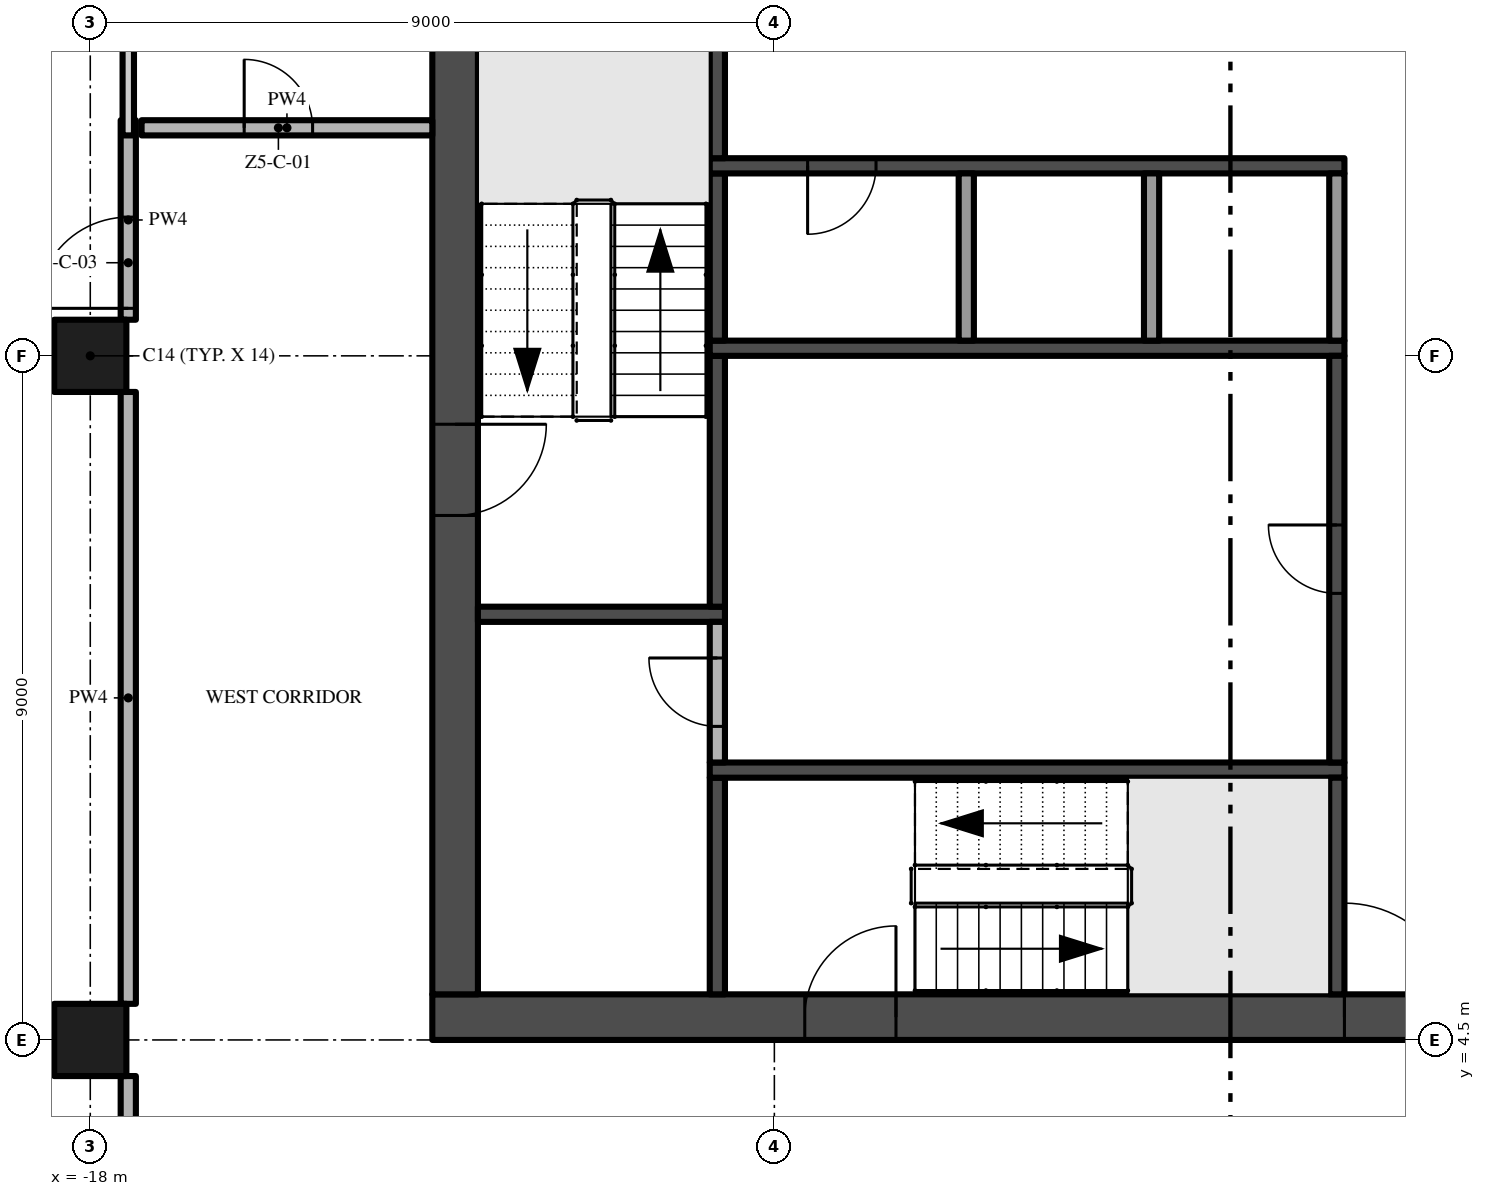
"""IFC4 building model, lengths in metres.
Left out: names, types, materials, properties, quantities, classifications, styles, units other than length and angle.
Written with IfcOpenShell. Run it as: python <this file> out.ifc"""

import sys

from ifc_helpers import new_model, si_unit, direction, frame, frame_2d, origin, origin_2d, place, context, subcontext, project, spatial, rectangle, extrude, element, fill, save


model = new_model("IFC4")
c1 = context("Model", 3, precision=1e-05, world=origin(), true_north=direction((0.0, 1.0)))
c2 = subcontext(c1, "Body", "Model", "MODEL_VIEW")
j1 = project(units=[si_unit("LENGTHUNIT", "METRE"), si_unit("PLANEANGLEUNIT", "RADIAN")], contexts=[c1])
p1 = place(None, origin())
s1 = spatial("IfcSite", under=j1, at=p1, CompositionType="ELEMENT")
p2 = place(p1, origin())
s2 = spatial("IfcBuilding", under=s1, at=p2, CompositionType="ELEMENT")
p3 = place(p2, frame((0.0, 0.0, 269.2)))
s3 = spatial("IfcBuildingStorey", under=s2, at=p3, CompositionType="ELEMENT", Elevation=269.2)
p4 = place(p3, frame((-13.5, 4.8, -0.3), z_axis=(0.0, 0.0, 1.0), x_axis=(1.0, 0.0, 0.0)))
e1 = element("IfcWall", 1, at=p4, inside=s3, PredefinedType="SHEAR", context=c2, shape_type="SweptSolid", body=[
    extrude(rectangle(XDim=27.0, YDim=0.6, at=frame_2d((13.5, 0.0))), origin(), (0.0, 0.0, 1.0), 3.8),
])
p5 = place(p4, frame((12.0, 0.0, 0.3)))
e2 = element("IfcOpeningElement", 2, at=p5, cuts=e1, PredefinedType="OPENING", context=c2, shape_type="SweptSolid", body=[
    extrude(rectangle(XDim=3.0, YDim=2.4, at=frame_2d((1.5, 1.2))), frame((0.0, 0.31, 0.0), z_axis=(0.0, -1.0, 0.0), x_axis=(1.0, 0.0, 0.0)), (0.0, 0.0, 1.0), 0.62),
])
p6 = place(p4, frame((4.9, 0.0, 0.3)))
e3 = element("IfcOpeningElement", 3, at=p6, cuts=e1, PredefinedType="OPENING", context=c2, shape_type="SweptSolid", body=[
    extrude(rectangle(XDim=1.2, YDim=2.2, at=frame_2d((0.6, 1.1))), frame((0.0, 0.31, 0.0), z_axis=(0.0, -1.0, 0.0), x_axis=(1.0, 0.0, 0.0)), (0.0, 0.0, 1.0), 0.62),
])
p7 = place(p4, frame((20.75, 0.0, 0.3)))
e4 = element("IfcOpeningElement", 4, at=p7, cuts=e1, PredefinedType="OPENING", context=c2, shape_type="SweptSolid", body=[
    extrude(rectangle(XDim=1.5, YDim=2.2, at=frame_2d((0.75, 1.1))), frame((0.0, 0.31, 0.0), z_axis=(0.0, -1.0, 0.0), x_axis=(1.0, 0.0, 0.0)), (0.0, 0.0, 1.0), 0.62),
])
p8 = place(p4, frame((17.4, 0.0, 0.3)))
e5 = element("IfcOpeningElement", 5, at=p8, cuts=e1, PredefinedType="OPENING", context=c2, shape_type="SweptSolid", body=[
    extrude(rectangle(XDim=1.2, YDim=2.2, at=frame_2d((0.6, 1.1))), frame((0.0, 0.31, 0.0), z_axis=(0.0, -1.0, 0.0), x_axis=(1.0, 0.0, 0.0)), (0.0, 0.0, 1.0), 0.62),
])
p9 = place(p3, frame((-13.2, 21.9, -0.3), z_axis=(0.0, 0.0, 1.0), x_axis=(0.0, -1.0, 0.0)))
e6 = element("IfcWall", 6, at=p9, inside=s3, PredefinedType="SHEAR", context=c2, shape_type="SweptSolid", body=[
    extrude(rectangle(XDim=16.8, YDim=0.6, at=frame_2d((8.4, 0.0))), origin(), (0.0, 0.0, 1.0), 3.8),
])
p10 = place(p9, frame((9.3, 0.0, 0.3)))
e7 = element("IfcOpeningElement", 7, at=p10, cuts=e6, PredefinedType="OPENING", context=c2, shape_type="SweptSolid", body=[
    extrude(rectangle(XDim=1.2, YDim=2.2, at=frame_2d((0.6, 1.1))), frame((0.0, 0.31, 0.0), z_axis=(0.0, -1.0, 0.0), x_axis=(1.0, 0.0, 0.0)), (0.0, 0.0, 1.0), 0.62),
])
for number, where, z_axis, x_axis in (
    (8, (-18.0, 13.5, 0.0), (0.0, 0.0, 1.0), (1.0, 0.0, 0.0)),
    (9, (-18.0, 4.5, 0.0), (0.0, 0.0, 1.0), (1.0, 0.0, 0.0)),
):
    element("IfcColumn", number, at=place(p3, frame(where, z_axis=z_axis, x_axis=x_axis)), inside=s3, PredefinedType="COLUMN", context=c2, shape_type="SweptSolid", body=[
        extrude(rectangle(XDim=0.95, YDim=0.95, at=origin_2d()), origin(), (0.0, 0.0, 1.0), 3.5),
    ])
p11 = place(p3, frame((-12.9, 10.1, 0.0), z_axis=(0.0, 0.0, 1.0), x_axis=(1.0, 0.0, 0.0)))
e10 = element("IfcWall", 10, at=p11, inside=s3, PredefinedType="SHEAR", context=c2, shape_type="SweptSolid", body=[
    extrude(rectangle(XDim=3.25, YDim=0.2, at=frame_2d((1.625, 0.0))), origin(), (0.0, 0.0, 1.0), 3.5),
])
p12 = place(p3, frame((-9.75, 5.1, 0.0), z_axis=(0.0, 0.0, 1.0), x_axis=(0.0, 1.0, 0.0)))
e11 = element("IfcWall", 11, at=p12, inside=s3, PredefinedType="SHEAR", context=c2, shape_type="SweptSolid", body=[
    extrude(rectangle(XDim=2.85, YDim=0.2, at=frame_2d((1.425, 0.0))), origin(), (0.0, 0.0, 1.0), 3.5),
])
p13 = place(p3, frame((-9.85, 8.05, 0.0), z_axis=(0.0, 0.0, 1.0), x_axis=(1.0, 0.0, 0.0)))
e12 = element("IfcWall", 12, at=p13, inside=s3, PredefinedType="SHEAR", context=c2, shape_type="SweptSolid", body=[
    extrude(rectangle(XDim=8.35, YDim=0.2, at=frame_2d((4.175, 0.0))), origin(), (0.0, 0.0, 1.0), 3.5),
])
p14 = place(p3, frame((-9.75, 8.15, 0.0), z_axis=(0.0, 0.0, 1.0), x_axis=(0.0, 1.0, 0.0)))
e13 = element("IfcWall", 13, at=p14, inside=s3, PredefinedType="PARTITIONING", context=c2, shape_type="SweptSolid", body=[
    extrude(rectangle(XDim=1.85, YDim=0.2, at=frame_2d((0.925, 0.0))), origin(), (0.0, 0.0, 1.0), 3.5),
])
p15 = place(p14, frame((0.475, 0.0, 0.0)))
e14 = element("IfcOpeningElement", 14, at=p15, cuts=e13, PredefinedType="OPENING", context=c2, shape_type="SweptSolid", body=[
    extrude(rectangle(XDim=0.9, YDim=2.1, at=frame_2d((0.45, 1.05))), frame((0.0, 0.11, 0.0), z_axis=(0.0, -1.0, 0.0), x_axis=(1.0, 0.0, 0.0)), (0.0, 0.0, 1.0), 0.22),
])
p16 = place(p3, frame((-9.75, 10.2, 0.0), z_axis=(0.0, 0.0, 1.0), x_axis=(0.0, 1.0, 0.0)))
e15 = element("IfcWall", 15, at=p16, inside=s3, PredefinedType="SHEAR", context=c2, shape_type="SweptSolid", body=[
    extrude(rectangle(XDim=3.3, YDim=0.2, at=frame_2d((1.65, 0.0))), origin(), (0.0, 0.0, 1.0), 3.5),
])
p17 = place(p3, frame((-9.85, 13.6, 0.0), z_axis=(0.0, 0.0, 1.0), x_axis=(1.0, 0.0, 0.0)))
e16 = element("IfcWall", 16, at=p17, inside=s3, PredefinedType="SHEAR", context=c2, shape_type="SweptSolid", body=[
    extrude(rectangle(XDim=8.35, YDim=0.2, at=frame_2d((4.175, 0.0))), origin(), (0.0, 0.0, 1.0), 3.5),
])
p18 = place(p3, frame((-9.75, 13.7, 0.0), z_axis=(0.0, 0.0, 1.0), x_axis=(0.0, 1.0, 0.0)))
e17 = element("IfcWall", 17, at=p18, inside=s3, PredefinedType="SHEAR", context=c2, shape_type="SweptSolid", body=[
    extrude(rectangle(XDim=2.2, YDim=0.2, at=frame_2d((1.1, 0.0))), origin(), (0.0, 0.0, 1.0), 3.5),
])
p19 = place(p3, frame((-1.5, 16.0, 0.0), z_axis=(0.0, 0.0, 1.0), x_axis=(-1.0, 0.0, 0.0)))
e18 = element("IfcWall", 18, at=p19, inside=s3, PredefinedType="SHEAR", context=c2, shape_type="SweptSolid", body=[
    extrude(rectangle(XDim=8.35, YDim=0.2, at=frame_2d((4.175, 0.0))), origin(), (0.0, 0.0, 1.0), 3.5),
])
p20 = place(p19, frame((6.162, 0.0, 0.0)))
e19 = element("IfcOpeningElement", 19, at=p20, cuts=e18, PredefinedType="OPENING", context=c2, shape_type="SweptSolid", body=[
    extrude(rectangle(XDim=0.9, YDim=2.1, at=frame_2d((0.45, 1.05))), frame((0.0, 0.11, 0.0), z_axis=(0.0, -1.0, 0.0), x_axis=(1.0, 0.0, 0.0)), (0.0, 0.0, 1.0), 0.22),
])
p21 = place(p3, frame((-9.75, 16.1, 0.0), z_axis=(0.0, 0.0, 1.0), x_axis=(0.0, 1.0, 0.0)))
e20 = element("IfcWall", 20, at=p21, inside=s3, PredefinedType="SHEAR", context=c2, shape_type="SweptSolid", body=[
    extrude(rectangle(XDim=1.5, YDim=0.2, at=frame_2d((0.75, 0.0))), origin(), (0.0, 0.0, 1.0), 3.5),
])
for number, where, z_axis, x_axis in (
    (21, (-6.475, 13.7, 0.0), (0.0, 0.0, 1.0), (0.0, 1.0, 0.0)),
    (22, (-4.037, 13.7, 0.0), (0.0, 0.0, 1.0), (0.0, 1.0, 0.0)),
):
    element("IfcWall", number, at=place(p3, frame(where, z_axis=z_axis, x_axis=x_axis)), inside=s3, PredefinedType="PARTITIONING", context=c2, shape_type="SweptSolid", body=[
        extrude(rectangle(XDim=2.2, YDim=0.2, at=frame_2d((1.1, 0.0))), origin(), (0.0, 0.0, 1.0), 3.5),
    ])
p22 = place(p3, frame((-1.6, 5.1, 0.0), z_axis=(0.0, 0.0, 1.0), x_axis=(0.0, 1.0, 0.0)))
e23 = element("IfcWall", 23, at=p22, inside=s3, PredefinedType="SHEAR", context=c2, shape_type="SweptSolid", body=[
    extrude(rectangle(XDim=2.85, YDim=0.2, at=frame_2d((1.425, 0.0))), origin(), (0.0, 0.0, 1.0), 3.5),
])
p23 = place(p3, frame((-1.6, 8.15, 0.0), z_axis=(0.0, 0.0, 1.0), x_axis=(0.0, 1.0, 0.0)))
e24 = element("IfcWall", 24, at=p23, inside=s3, PredefinedType="SHEAR", context=c2, shape_type="SweptSolid", body=[
    extrude(rectangle(XDim=5.35, YDim=0.2, at=frame_2d((2.675, 0.0))), origin(), (0.0, 0.0, 1.0), 3.5),
])
p24 = place(p23, frame((2.225, 0.0, 0.0)))
e25 = element("IfcOpeningElement", 25, at=p24, cuts=e24, PredefinedType="OPENING", context=c2, shape_type="SweptSolid", body=[
    extrude(rectangle(XDim=0.9, YDim=2.1, at=frame_2d((0.45, 1.05))), frame((0.0, 0.11, 0.0), z_axis=(0.0, -1.0, 0.0), x_axis=(1.0, 0.0, 0.0)), (0.0, 0.0, 1.0), 0.22),
])
p25 = place(p3, frame((-1.6, 13.7, 0.0), z_axis=(0.0, 0.0, 1.0), x_axis=(0.0, 1.0, 0.0)))
e26 = element("IfcWall", 26, at=p25, inside=s3, PredefinedType="PARTITIONING", context=c2, shape_type="SweptSolid", body=[
    extrude(rectangle(XDim=2.2, YDim=0.2, at=frame_2d((1.1, 0.0))), origin(), (0.0, 0.0, 1.0), 3.5),
])
p26 = place(p3, frame((-17.325, 16.5, 0.0), z_axis=(0.0, 0.0, 1.0), x_axis=(1.0, 0.0, 0.0)))
e27 = element("IfcWall", 27, at=p26, inside=s3, PredefinedType="PARTITIONING", context=c2, shape_type="SweptSolid", body=[
    extrude(rectangle(XDim=3.825, YDim=0.2, at=frame_2d((1.913, 0.0))), origin(), (0.0, 0.0, 1.0), 3.5),
])
p27 = place(p26, frame((1.35, 0.0, 0.0)))
e28 = element("IfcOpeningElement", 28, at=p27, cuts=e27, PredefinedType="OPENING", context=c2, shape_type="SweptSolid", body=[
    extrude(rectangle(XDim=0.9, YDim=2.1, at=frame_2d((0.45, 1.05))), frame((0.0, 0.11, 0.0), z_axis=(0.0, -1.0, 0.0), x_axis=(1.0, 0.0, 0.0)), (0.0, 0.0, 1.0), 0.22),
])
p28 = place(p3, frame((-17.5, -0.2, 0.0), z_axis=(0.0, 0.0, 1.0), x_axis=(0.0, 1.0, 0.0)))
e29 = element("IfcWall", 29, at=p28, inside=s3, PredefinedType="PARTITIONING", context=c2, shape_type="SweptSolid", body=[
    extrude(rectangle(XDim=4.225, YDim=0.2, at=frame_2d((2.112, 0.0))), origin(), (0.0, 0.0, 1.0), 3.5),
])
p29 = place(p3, frame((-17.5, 4.975, 0.0), z_axis=(0.0, 0.0, 1.0), x_axis=(0.0, 1.0, 0.0)))
e30 = element("IfcWall", 30, at=p29, inside=s3, PredefinedType="PARTITIONING", context=c2, shape_type="SweptSolid", body=[
    extrude(rectangle(XDim=8.05, YDim=0.2, at=frame_2d((4.025, 0.0))), origin(), (0.0, 0.0, 1.0), 3.5),
])
p30 = place(p3, frame((-17.5, 13.975, 0.0), z_axis=(0.0, 0.0, 1.0), x_axis=(0.0, 1.0, 0.0)))
e31 = element("IfcWall", 31, at=p30, inside=s3, PredefinedType="PARTITIONING", context=c2, shape_type="SweptSolid", body=[
    extrude(rectangle(XDim=2.625, YDim=0.2, at=frame_2d((1.312, 0.0))), origin(), (0.0, 0.0, 1.0), 3.5),
])
p31 = place(p30, frame((0.15, 0.0, 0.0)))
e32 = element("IfcOpeningElement", 32, at=p31, cuts=e31, PredefinedType="OPENING", context=c2, shape_type="SweptSolid", body=[
    extrude(rectangle(XDim=1.2, YDim=2.4, at=frame_2d((0.6, 1.2))), frame((0.0, 0.11, 0.0), z_axis=(0.0, -1.0, 0.0), x_axis=(1.0, 0.0, 0.0)), (0.0, 0.0, 1.0), 0.22),
])
p32 = place(p3, frame((-17.5, 16.4, 0.0), z_axis=(0.0, 0.0, 1.0), x_axis=(0.0, 1.0, 0.0)))
e33 = element("IfcWall", 33, at=p32, inside=s3, PredefinedType="PARTITIONING", context=c2, shape_type="SweptSolid", body=[
    extrude(rectangle(XDim=5.2, YDim=0.15, at=frame_2d((2.6, 0.0))), origin(), (0.0, 0.0, 1.0), 3.5),
])
p33 = place(p5, frame((3.0, 0.0, 0.0), z_axis=(0.0, 0.0, 1.0), x_axis=(-1.0, 0.0, 0.0)))
e34 = element("IfcDoor", 34, at=p33, inside=s3, OperationType="DOUBLE_DOOR_SINGLE_SWING", PredefinedType="DOOR", context=c2, shape_type="SweptSolid", body=[
    extrude(rectangle(XDim=3.0, YDim=2.4, at=frame_2d((1.5, 1.2))), frame((0.0, 0.025, 0.0), z_axis=(0.0, -1.0, 0.0), x_axis=(1.0, 0.0, 0.0)), (0.0, 0.0, 1.0), 0.05),
])
fill(e2, e34)
p34 = place(p10, frame((1.2, 0.0, 0.0), z_axis=(0.0, 0.0, 1.0), x_axis=(-1.0, 0.0, 0.0)))
e35 = element("IfcDoor", 35, at=p34, inside=s3, OperationType="SINGLE_SWING_RIGHT", PredefinedType="DOOR", context=c2, shape_type="SweptSolid", body=[
    extrude(rectangle(XDim=1.2, YDim=2.2, at=frame_2d((0.6, 1.1))), frame((0.0, 0.025, 0.0), z_axis=(0.0, -1.0, 0.0), x_axis=(1.0, 0.0, 0.0)), (0.0, 0.0, 1.0), 0.05),
])
fill(e7, e35)
p35 = place(p6, frame((1.2, 0.0, 0.0), z_axis=(0.0, 0.0, 1.0), x_axis=(-1.0, 0.0, 0.0)))
e36 = element("IfcDoor", 36, at=p35, inside=s3, OperationType="SINGLE_SWING_LEFT", PredefinedType="DOOR", context=c2, shape_type="SweptSolid", body=[
    extrude(rectangle(XDim=1.2, YDim=2.2, at=frame_2d((0.6, 1.1))), frame((0.0, 0.025, 0.0), z_axis=(0.0, -1.0, 0.0), x_axis=(1.0, 0.0, 0.0)), (0.0, 0.0, 1.0), 0.05),
])
fill(e3, e36)
p36 = place(p24, origin())
e37 = element("IfcDoor", 37, at=p36, inside=s3, OperationType="SINGLE_SWING_RIGHT", PredefinedType="DOOR", context=c2, shape_type="SweptSolid", body=[
    extrude(rectangle(XDim=0.9, YDim=2.1, at=frame_2d((0.45, 1.05))), frame((0.0, 0.025, 0.0), z_axis=(0.0, -1.0, 0.0), x_axis=(1.0, 0.0, 0.0)), (0.0, 0.0, 1.0), 0.05),
])
fill(e25, e37)
p37 = place(p20, origin())
e38 = element("IfcDoor", 38, at=p37, inside=s3, OperationType="SINGLE_SWING_RIGHT", PredefinedType="DOOR", context=c2, shape_type="SweptSolid", body=[
    extrude(rectangle(XDim=0.9, YDim=2.1, at=frame_2d((0.45, 1.05))), frame((0.0, 0.025, 0.0), z_axis=(0.0, -1.0, 0.0), x_axis=(1.0, 0.0, 0.0)), (0.0, 0.0, 1.0), 0.05),
])
fill(e19, e38)
p38 = place(p15, origin())
e39 = element("IfcDoor", 39, at=p38, inside=s3, OperationType="SINGLE_SWING_RIGHT", PredefinedType="DOOR", context=c2, shape_type="SweptSolid", body=[
    extrude(rectangle(XDim=0.9, YDim=2.1, at=frame_2d((0.45, 1.05))), frame((0.0, 0.025, 0.0), z_axis=(0.0, -1.0, 0.0), x_axis=(1.0, 0.0, 0.0)), (0.0, 0.0, 1.0), 0.05),
])
fill(e14, e39)
p39 = place(p27, origin())
e40 = element("IfcDoor", 40, at=p39, inside=s3, OperationType="SINGLE_SWING_LEFT", PredefinedType="DOOR", context=c2, shape_type="SweptSolid", body=[
    extrude(rectangle(XDim=0.9, YDim=2.1, at=frame_2d((0.45, 1.05))), frame((0.0, 0.025, 0.0), z_axis=(0.0, -1.0, 0.0), x_axis=(1.0, 0.0, 0.0)), (0.0, 0.0, 1.0), 0.05),
])
fill(e28, e40)
p40 = place(p31, origin())
e41 = element("IfcDoor", 41, at=p40, inside=s3, OperationType="SINGLE_SWING_LEFT", PredefinedType="DOOR", context=c2, shape_type="SweptSolid", body=[
    extrude(rectangle(XDim=1.2, YDim=2.4, at=frame_2d((0.6, 1.2))), frame((0.0, 0.025, 0.0), z_axis=(0.0, -1.0, 0.0), x_axis=(1.0, 0.0, 0.0)), (0.0, 0.0, 1.0), 0.05),
])
fill(e32, e41)
save(model, sys.argv[1])
